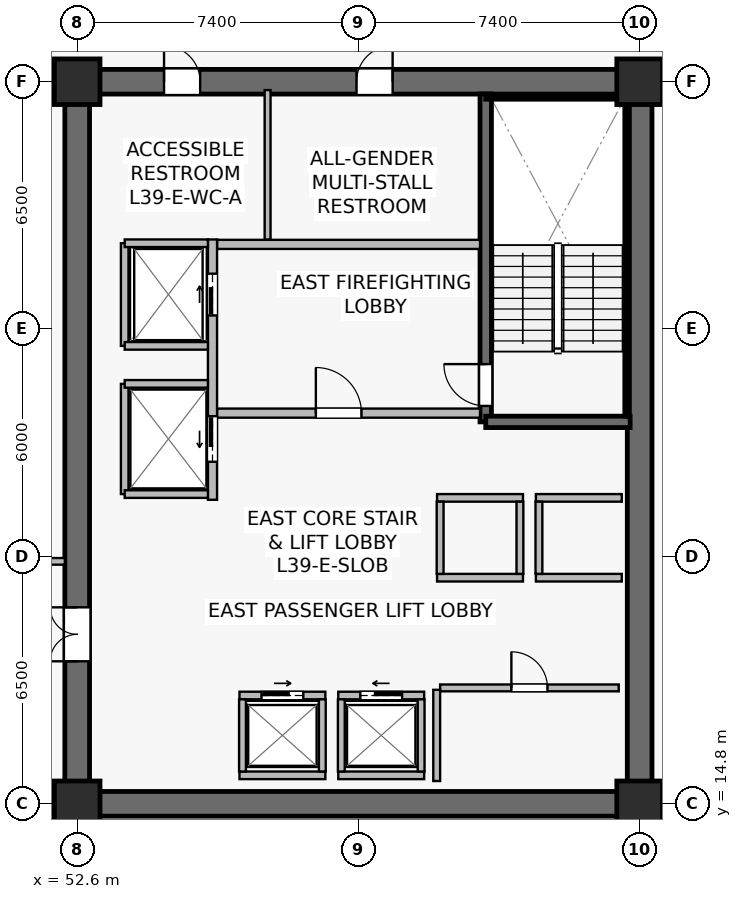
"""IFC4 building model, lengths in metres.
Left out: names, types, materials, properties, quantities, classifications, styles, units other than length and angle.
Written with IfcOpenShell. Run it as: python <this file> out.ifc"""

import sys

from ifc_helpers import new_model, si_unit, direction, frame, frame_2d, origin, origin_2d, place, context, subcontext, project, spatial, rectangle, extrude, source, transform, mapped, element, fill, save


model = new_model("IFC4")
c1 = context("Model", 3, precision=1e-05, world=origin(), true_north=direction((0.0, 1.0)))
c2 = subcontext(c1, "Body", "Model", "MODEL_VIEW")
j1 = project(units=[si_unit("LENGTHUNIT", "METRE"), si_unit("PLANEANGLEUNIT", "RADIAN")], contexts=[c1])
p1 = place(None, origin())
s1 = spatial("IfcSite", under=j1, at=p1, CompositionType="ELEMENT")
p2 = place(p1, origin())
s2 = spatial("IfcBuilding", under=s1, at=p2, CompositionType="ELEMENT")
p3 = place(p2, frame((0.0, 0.0, 162.5)))
s3 = spatial("IfcBuildingStorey", under=s2, at=p3, CompositionType="ELEMENT", Elevation=162.5)
p4 = place(p3, frame((52.275, 14.8, 0.0), z_axis=(0.0, 0.0, 1.0), x_axis=(1.0, 0.0, 0.0)))
e1 = element("IfcWall", 1, at=p4, inside=s3, PredefinedType="SHEAR", context=c2, shape_type="SweptSolid", body=[
    extrude(rectangle(XDim=15.45, YDim=0.65, at=frame_2d((7.725, 0.0))), origin(), (0.0, 0.0, 1.0), 3.79),
])
p5 = place(p3, frame((52.275, 33.8, 0.0), z_axis=(0.0, 0.0, 1.0), x_axis=(1.0, 0.0, 0.0)))
e2 = element("IfcWall", 2, at=p5, inside=s3, PredefinedType="SHEAR", context=c2, shape_type="SweptSolid", body=[
    extrude(rectangle(XDim=15.45, YDim=0.65, at=frame_2d((7.725, 0.0))), origin(), (0.0, 0.0, 1.0), 3.79),
])
p6 = place(p5, frame((7.675, 0.0, 0.0)))
e3 = element("IfcOpeningElement", 3, at=p6, cuts=e2, PredefinedType="OPENING", context=c2, shape_type="SweptSolid", body=[
    extrude(rectangle(XDim=0.95, YDim=2.15, at=frame_2d((0.475, 1.075))), frame((0.0, 0.335, 0.0), z_axis=(0.0, -1.0, 0.0), x_axis=(1.0, 0.0, 0.0)), (0.0, 0.0, 1.0), 0.67),
])
p7 = place(p5, frame((2.61, 0.0, 0.0)))
e4 = element("IfcOpeningElement", 4, at=p7, cuts=e2, PredefinedType="OPENING", context=c2, shape_type="SweptSolid", body=[
    extrude(rectangle(XDim=0.95, YDim=2.15, at=frame_2d((0.475, 1.075))), frame((0.0, 0.335, 0.0), z_axis=(0.0, -1.0, 0.0), x_axis=(1.0, 0.0, 0.0)), (0.0, 0.0, 1.0), 0.67),
])
p8 = place(p3, frame((52.6, 15.125, 0.0), z_axis=(0.0, 0.0, 1.0), x_axis=(0.0, 1.0, 0.0)))
e5 = element("IfcWall", 5, at=p8, inside=s3, PredefinedType="SHEAR", context=c2, shape_type="SweptSolid", body=[
    extrude(rectangle(XDim=18.35, YDim=0.65, at=frame_2d((9.175, 0.0))), origin(), (0.0, 0.0, 1.0), 3.79),
])
p9 = place(p8, frame((3.425, 0.0, 0.0)))
e6 = element("IfcOpeningElement", 6, at=p9, cuts=e5, PredefinedType="OPENING", context=c2, shape_type="SweptSolid", body=[
    extrude(rectangle(XDim=1.42, YDim=2.2, at=frame_2d((0.71, 1.1))), frame((0.0, 0.335, 0.0), z_axis=(0.0, -1.0, 0.0), x_axis=(1.0, 0.0, 0.0)), (0.0, 0.0, 1.0), 0.67),
])
p10 = place(p3, frame((67.4, 15.125, 0.0), z_axis=(0.0, 0.0, 1.0), x_axis=(0.0, 1.0, 0.0)))
e7 = element("IfcWall", 7, at=p10, inside=s3, PredefinedType="SHEAR", context=c2, shape_type="SweptSolid", body=[
    extrude(rectangle(XDim=18.35, YDim=0.65, at=frame_2d((9.175, 0.0))), origin(), (0.0, 0.0, 1.0), 3.79),
])
p11 = place(p3, frame((63.35, 24.85, 0.0), z_axis=(0.0, 0.0, 1.0), x_axis=(0.0, 1.0, 0.0)))
e8 = element("IfcWall", 8, at=p11, inside=s3, PredefinedType="SHEAR", context=c2, shape_type="SweptSolid", body=[
    extrude(rectangle(XDim=8.63, YDim=0.3, at=frame_2d((4.315, 0.0))), origin(), (0.0, 0.0, 1.0), 3.79),
])
p12 = place(p11, frame((0.42, 0.0, 0.0)))
e9 = element("IfcOpeningElement", 9, at=p12, cuts=e8, PredefinedType="OPENING", context=c2, shape_type="SweptSolid", body=[
    extrude(rectangle(XDim=1.1, YDim=2.15, at=frame_2d((0.55, 1.075))), frame((0.0, 0.16, 0.0), z_axis=(0.0, -1.0, 0.0), x_axis=(1.0, 0.0, 0.0)), (0.0, 0.0, 1.0), 0.32),
])
p13 = place(p3, frame((63.35, 24.85, 0.0), z_axis=(0.0, 0.0, 1.0), x_axis=(1.0, 0.0, 0.0)))
e10 = element("IfcWall", 10, at=p13, inside=s3, PredefinedType="SHEAR", context=c2, shape_type="SweptSolid", body=[
    extrude(rectangle(XDim=3.8, YDim=0.3, at=frame_2d((1.9, 0.0))), origin(), (0.0, 0.0, 1.0), 3.79),
])
p14 = place(p3, frame((63.35, 33.4, 0.0), z_axis=(0.0, 0.0, 1.0), x_axis=(1.0, 0.0, 0.0)))
e11 = element("IfcWall", 11, at=p14, inside=s3, PredefinedType="SOLIDWALL", context=c2, shape_type="SweptSolid", body=[
    extrude(rectangle(XDim=3.72, YDim=0.12, at=frame_2d((1.86, 0.0))), origin(), (0.0, 0.0, 1.0), 3.79),
])
p15 = place(p3, frame((67.07, 25.0, 0.0), z_axis=(0.0, 0.0, 1.0), x_axis=(0.0, 1.0, 0.0)))
e12 = element("IfcWall", 12, at=p15, inside=s3, PredefinedType="SOLIDWALL", context=c2, shape_type="SweptSolid", body=[
    extrude(rectangle(XDim=8.32, YDim=0.12, at=frame_2d((4.16, 0.0))), origin(), (0.0, 0.0, 1.0), 3.79),
])
m1 = source(origin(), c2, "Body", "SweptSolid", [
    extrude(rectangle(XDim=1.2, YDim=1.2, at=origin_2d()), origin(), (0.0, 0.0, 1.0), 4.1),
])
for number, where, z_axis, x_axis in (
    (13, (52.6, 14.8, 0.0), (0.0, 0.0, 1.0), (1.0, 0.0, 0.0)),
    (14, (67.4, 14.8, 0.0), (0.0, 0.0, 1.0), (1.0, 0.0, 0.0)),
    (15, (52.6, 33.8, 0.0), (0.0, 0.0, 1.0), (1.0, 0.0, 0.0)),
    (16, (67.4, 33.8, 0.0), (0.0, 0.0, 1.0), (1.0, 0.0, 0.0)),
):
    element("IfcColumn", number, at=place(p3, frame(where, z_axis=z_axis, x_axis=x_axis)), inside=s3, PredefinedType="COLUMN", context=c2, shape_type="MappedRepresentation", body=[
        mapped(m1, transform((0.0, 0.0, 0.0), scale=1.0)),
    ])
p16 = place(p3, frame((56.28, 25.08, 0.0), z_axis=(0.0, 0.0, 1.0), x_axis=(1.0, 0.0, 0.0)))
e17 = element("IfcWall", 17, at=p16, inside=s3, PredefinedType="SOLIDWALL", context=c2, shape_type="SweptSolid", body=[
    extrude(rectangle(XDim=6.92, YDim=0.24, at=frame_2d((3.46, 0.0))), origin(), (0.0, 0.0, 1.0), 3.187),
])
p17 = place(p16, frame((2.6, 0.0, 0.0)))
e18 = element("IfcOpeningElement", 18, at=p17, cuts=e17, PredefinedType="OPENING", context=c2, shape_type="SweptSolid", body=[
    extrude(rectangle(XDim=1.2, YDim=2.16, at=frame_2d((0.6, 1.08))), frame((0.0, 0.13, 0.0), z_axis=(0.0, -1.0, 0.0), x_axis=(1.0, 0.0, 0.0)), (0.0, 0.0, 1.0), 0.26),
])
p18 = place(p3, frame((56.28, 29.52, 0.0), z_axis=(0.0, 0.0, 1.0), x_axis=(1.0, 0.0, 0.0)))
e19 = element("IfcWall", 19, at=p18, inside=s3, PredefinedType="SOLIDWALL", context=c2, shape_type="SweptSolid", body=[
    extrude(rectangle(XDim=6.92, YDim=0.24, at=frame_2d((3.46, 0.0))), origin(), (0.0, 0.0, 1.0), 3.187),
])
p19 = place(p3, frame((56.16, 22.8, 0.0), z_axis=(0.0, 0.0, 1.0), x_axis=(0.0, 1.0, 0.0)))
e20 = element("IfcWall", 20, at=p19, inside=s3, PredefinedType="SOLIDWALL", context=c2, shape_type="SweptSolid", body=[
    extrude(rectangle(XDim=6.85, YDim=0.24, at=frame_2d((3.425, 0.0))), origin(), (0.0, 0.0, 1.0), 2.925),
])
p20 = place(p19, frame((4.85, 0.0, 0.0)))
e21 = element("IfcOpeningElement", 21, at=p20, cuts=e20, PredefinedType="OPENING", context=c2, shape_type="SweptSolid", body=[
    extrude(rectangle(XDim=1.1, YDim=2.22, at=frame_2d((0.55, 1.11))), frame((0.0, 0.13, 0.0), z_axis=(0.0, -1.0, 0.0), x_axis=(1.0, 0.0, 0.0)), (0.0, 0.0, 1.0), 0.26),
])
p21 = place(p19, frame((1.0, 0.0, 0.0)))
e22 = element("IfcOpeningElement", 22, at=p21, cuts=e20, PredefinedType="OPENING", context=c2, shape_type="SweptSolid", body=[
    extrude(rectangle(XDim=1.2, YDim=2.22, at=frame_2d((0.6, 1.11))), frame((0.0, 0.13, 0.0), z_axis=(0.0, -1.0, 0.0), x_axis=(1.0, 0.0, 0.0)), (0.0, 0.0, 1.0), 0.26),
])
p22 = place(p3, frame((59.47, 17.65, 0.0), z_axis=(0.0, 0.0, 1.0), x_axis=(1.0, 0.0, 0.0)))
e23 = element("IfcWall", 23, at=p22, inside=s3, PredefinedType="SOLIDWALL", context=c2, shape_type="SweptSolid", body=[
    extrude(rectangle(XDim=2.26, YDim=0.2, at=frame_2d((1.13, 0.0))), origin(), (0.0, 0.0, 1.0), 3.187),
])
p23 = place(p22, frame((0.58, 0.0, 0.0)))
e24 = element("IfcOpeningElement", 24, at=p23, cuts=e23, PredefinedType="OPENING", context=c2, shape_type="SweptSolid", body=[
    extrude(rectangle(XDim=1.1, YDim=2.22, at=frame_2d((0.55, 1.11))), frame((0.0, 0.11, 0.0), z_axis=(0.0, -1.0, 0.0), x_axis=(1.0, 0.0, 0.0)), (0.0, 0.0, 1.0), 0.22),
])
p24 = place(p3, frame((59.47, 15.55, 0.0), z_axis=(0.0, 0.0, 1.0), x_axis=(1.0, 0.0, 0.0)))
e25 = element("IfcWall", 25, at=p24, inside=s3, PredefinedType="SOLIDWALL", context=c2, shape_type="SweptSolid", body=[
    extrude(rectangle(XDim=2.26, YDim=0.2, at=frame_2d((1.13, 0.0))), origin(), (0.0, 0.0, 1.0), 3.187),
])
for number, where, z_axis, x_axis in (
    (26, (59.55, 15.65, 0.0), (0.0, 0.0, 1.0), (0.0, 1.0, 0.0)),
    (27, (61.65, 15.65, 0.0), (0.0, 0.0, 1.0), (0.0, 1.0, 0.0)),
):
    element("IfcWall", number, at=place(p3, frame(where, z_axis=z_axis, x_axis=x_axis)), inside=s3, PredefinedType="SOLIDWALL", context=c2, shape_type="SweptSolid", body=[
        extrude(rectangle(XDim=1.9, YDim=0.18, at=frame_2d((0.95, 0.0))), origin(), (0.0, 0.0, 1.0), 3.79),
    ])
p25 = place(p3, frame((56.87, 17.65, 0.0), z_axis=(0.0, 0.0, 1.0), x_axis=(1.0, 0.0, 0.0)))
e28 = element("IfcWall", 28, at=p25, inside=s3, PredefinedType="SOLIDWALL", context=c2, shape_type="SweptSolid", body=[
    extrude(rectangle(XDim=2.26, YDim=0.2, at=frame_2d((1.13, 0.0))), origin(), (0.0, 0.0, 1.0), 3.79),
])
p26 = place(p25, frame((0.58, 0.0, 0.0)))
e29 = element("IfcOpeningElement", 29, at=p26, cuts=e28, PredefinedType="OPENING", context=c2, shape_type="SweptSolid", body=[
    extrude(rectangle(XDim=1.1, YDim=2.22, at=frame_2d((0.55, 1.11))), frame((0.0, 0.11, 0.0), z_axis=(0.0, -1.0, 0.0), x_axis=(1.0, 0.0, 0.0)), (0.0, 0.0, 1.0), 0.22),
])
p27 = place(p3, frame((56.87, 15.55, 0.0), z_axis=(0.0, 0.0, 1.0), x_axis=(1.0, 0.0, 0.0)))
e30 = element("IfcWall", 30, at=p27, inside=s3, PredefinedType="SOLIDWALL", context=c2, shape_type="SweptSolid", body=[
    extrude(rectangle(XDim=2.26, YDim=0.2, at=frame_2d((1.13, 0.0))), origin(), (0.0, 0.0, 1.0), 3.79),
])
for number, where, z_axis, x_axis in (
    (31, (56.95, 15.65, 0.0), (0.0, 0.0, 1.0), (0.0, 1.0, 0.0)),
    (32, (59.05, 15.65, 0.0), (0.0, 0.0, 1.0), (0.0, 1.0, 0.0)),
):
    element("IfcWall", number, at=place(p3, frame(where, z_axis=z_axis, x_axis=x_axis)), inside=s3, PredefinedType="SOLIDWALL", context=c2, shape_type="SweptSolid", body=[
        extrude(rectangle(XDim=1.9, YDim=0.18, at=frame_2d((0.95, 0.0))), origin(), (0.0, 0.0, 1.0), 3.79),
    ])
for number, where, z_axis, x_axis in (
    (33, (64.67, 20.75, 0.0), (0.0, 0.0, 1.0), (1.0, 0.0, 0.0)),
    (34, (64.67, 22.85, 0.0), (0.0, 0.0, 1.0), (1.0, 0.0, 0.0)),
):
    element("IfcWall", number, at=place(p3, frame(where, z_axis=z_axis, x_axis=x_axis)), inside=s3, PredefinedType="SOLIDWALL", context=c2, shape_type="SweptSolid", body=[
        extrude(rectangle(XDim=2.26, YDim=0.2, at=frame_2d((1.13, 0.0))), origin(), (0.0, 0.0, 1.0), 3.79),
    ])
p28 = place(p3, frame((64.75, 20.85, 0.0), z_axis=(0.0, 0.0, 1.0), x_axis=(0.0, 1.0, 0.0)))
e35 = element("IfcWall", 35, at=p28, inside=s3, PredefinedType="SOLIDWALL", context=c2, shape_type="SweptSolid", body=[
    extrude(rectangle(XDim=1.9, YDim=0.18, at=frame_2d((0.95, 0.0))), origin(), (0.0, 0.0, 1.0), 3.79),
])
for number, where, z_axis, x_axis in (
    (36, (62.07, 20.75, 0.0), (0.0, 0.0, 1.0), (1.0, 0.0, 0.0)),
    (37, (62.07, 22.85, 0.0), (0.0, 0.0, 1.0), (1.0, 0.0, 0.0)),
):
    element("IfcWall", number, at=place(p3, frame(where, z_axis=z_axis, x_axis=x_axis)), inside=s3, PredefinedType="SOLIDWALL", context=c2, shape_type="SweptSolid", body=[
        extrude(rectangle(XDim=2.26, YDim=0.2, at=frame_2d((1.13, 0.0))), origin(), (0.0, 0.0, 1.0), 3.79),
    ])
for number, where, z_axis, x_axis in (
    (38, (62.15, 20.85, 0.0), (0.0, 0.0, 1.0), (0.0, 1.0, 0.0)),
    (39, (64.25, 20.85, 0.0), (0.0, 0.0, 1.0), (0.0, 1.0, 0.0)),
):
    element("IfcWall", number, at=place(p3, frame(where, z_axis=z_axis, x_axis=x_axis)), inside=s3, PredefinedType="SOLIDWALL", context=c2, shape_type="SweptSolid", body=[
        extrude(rectangle(XDim=1.9, YDim=0.18, at=frame_2d((0.95, 0.0))), origin(), (0.0, 0.0, 1.0), 3.79),
    ])
p29 = place(p3, frame((53.85, 26.85, 0.0), z_axis=(0.0, 0.0, 1.0), x_axis=(0.0, 1.0, 0.0)))
e40 = element("IfcWall", 40, at=p29, inside=s3, PredefinedType="SOLIDWALL", context=c2, shape_type="SweptSolid", body=[
    extrude(rectangle(XDim=2.7, YDim=0.2, at=frame_2d((1.35, 0.0))), origin(), (0.0, 0.0, 1.0), 3.79),
])
p30 = place(p3, frame((53.85, 29.55, 0.0), z_axis=(0.0, 0.0, 1.0), x_axis=(1.0, 0.0, 0.0)))
e41 = element("IfcWall", 41, at=p30, inside=s3, PredefinedType="SOLIDWALL", context=c2, shape_type="SweptSolid", body=[
    extrude(rectangle(XDim=2.19, YDim=0.2, at=frame_2d((1.095, 0.0))), origin(), (0.0, 0.0, 1.0), 3.79),
])
p31 = place(p3, frame((53.85, 26.85, 0.0), z_axis=(0.0, 0.0, 1.0), x_axis=(1.0, 0.0, 0.0)))
e42 = element("IfcWall", 42, at=p31, inside=s3, PredefinedType="SOLIDWALL", context=c2, shape_type="SweptSolid", body=[
    extrude(rectangle(XDim=2.19, YDim=0.2, at=frame_2d((1.095, 0.0))), origin(), (0.0, 0.0, 1.0), 3.187),
])
p32 = place(p3, frame((53.85, 22.95, 0.0), z_axis=(0.0, 0.0, 1.0), x_axis=(0.0, 1.0, 0.0)))
e43 = element("IfcWall", 43, at=p32, inside=s3, PredefinedType="SOLIDWALL", context=c2, shape_type="SweptSolid", body=[
    extrude(rectangle(XDim=2.9, YDim=0.2, at=frame_2d((1.45, 0.0))), origin(), (0.0, 0.0, 1.0), 2.925),
])
for number, where, z_axis, x_axis in (
    (44, (53.85, 25.85, 0.0), (0.0, 0.0, 1.0), (1.0, 0.0, 0.0)),
    (45, (53.85, 22.95, 0.0), (0.0, 0.0, 1.0), (1.0, 0.0, 0.0)),
):
    element("IfcWall", number, at=place(p3, frame(where, z_axis=z_axis, x_axis=x_axis)), inside=s3, PredefinedType="SOLIDWALL", context=c2, shape_type="SweptSolid", body=[
        extrude(rectangle(XDim=2.19, YDim=0.2, at=frame_2d((1.095, 0.0))), origin(), (0.0, 0.0, 1.0), 3.79),
    ])
p33 = place(p3, frame((62.15, 17.85, 0.0), z_axis=(0.0, 0.0, 1.0), x_axis=(1.0, 0.0, 0.0)))
e46 = element("IfcWall", 46, at=p33, inside=s3, PredefinedType="SOLIDWALL", context=c2, shape_type="SweptSolid", body=[
    extrude(rectangle(XDim=4.7, YDim=0.18, at=frame_2d((2.35, 0.0))), origin(), (0.0, 0.0, 1.0), 3.79),
])
p34 = place(p33, frame((1.875, 0.0, 0.0)))
e47 = element("IfcOpeningElement", 47, at=p34, cuts=e46, PredefinedType="OPENING", context=c2, shape_type="SweptSolid", body=[
    extrude(rectangle(XDim=0.95, YDim=2.15, at=frame_2d((0.475, 1.075))), frame((0.0, 0.1, 0.0), z_axis=(0.0, -1.0, 0.0), x_axis=(1.0, 0.0, 0.0)), (0.0, 0.0, 1.0), 0.2),
])
p35 = place(p3, frame((62.06, 15.4, 0.0), z_axis=(0.0, 0.0, 1.0), x_axis=(0.0, 1.0, 0.0)))
e48 = element("IfcWall", 48, at=p35, inside=s3, PredefinedType="SOLIDWALL", context=c2, shape_type="SweptSolid", body=[
    extrude(rectangle(XDim=2.4, YDim=0.18, at=frame_2d((1.2, 0.0))), origin(), (0.0, 0.0, 1.0), 3.79),
])
p36 = place(p3, frame((57.61, 29.65, 0.0), z_axis=(0.0, 0.0, 1.0), x_axis=(0.0, 1.0, 0.0)))
e49 = element("IfcWall", 49, at=p36, inside=s3, PredefinedType="PLUMBINGWALL", context=c2, shape_type="SweptSolid", body=[
    extrude(rectangle(XDim=3.93, YDim=0.155, at=frame_2d((1.965, 0.0))), origin(), (0.0, 0.0, 1.0), 3.79),
])
p37 = place(p3, frame((48.3, 34.26, 0.0), z_axis=(0.0, 0.0, 1.0), x_axis=(1.0, 0.0, 0.0)))
e50 = element("IfcWall", 50, at=p37, inside=s3, PredefinedType="PARTITIONING", context=c2, shape_type="SweptSolid", body=[
    extrude(rectangle(XDim=3.975, YDim=0.175, at=frame_2d((1.987, 0.0))), origin(), (0.0, 0.0, 1.0), 3.475),
])
p38 = place(p3, frame((48.3, 21.18, 0.0), z_axis=(0.0, 0.0, 1.0), x_axis=(1.0, 0.0, 0.0)))
e51 = element("IfcWall", 51, at=p38, inside=s3, PredefinedType="PARTITIONING", context=c2, shape_type="SweptSolid", body=[
    extrude(rectangle(XDim=3.975, YDim=0.175, at=frame_2d((1.987, 0.0))), origin(), (0.0, 0.0, 1.0), 3.79),
])
p39 = place(p38, frame((1.35, 0.0, 0.0)))
e52 = element("IfcOpeningElement", 52, at=p39, cuts=e51, PredefinedType="OPENING", context=c2, shape_type="SweptSolid", body=[
    extrude(rectangle(XDim=0.95, YDim=2.15, at=frame_2d((0.475, 1.075))), frame((0.0, 0.098, 0.0), z_axis=(0.0, -1.0, 0.0), x_axis=(1.0, 0.0, 0.0)), (0.0, 0.0, 1.0), 0.195),
])
m2 = source(origin(), c2, "Body", "SweptSolid", [
    extrude(rectangle(XDim=1.1, YDim=2.15, at=frame_2d((0.55, 1.075))), frame((0.0, 0.025, 0.0), z_axis=(0.0, -1.0, 0.0), x_axis=(1.0, 0.0, 0.0)), (0.0, 0.0, 1.0), 0.05),
])
p40 = place(p12, origin())
e53 = element("IfcDoor", 53, at=p40, inside=s3, OperationType="SINGLE_SWING_RIGHT", PredefinedType="DOOR", context=c2, shape_type="MappedRepresentation", body=[
    mapped(m2, transform((0.0, 0.0, 0.0), scale=1.0)),
])
fill(e9, e53)
m3 = source(origin(), c2, "Body", "SweptSolid", [
    extrude(rectangle(XDim=1.2, YDim=2.16, at=frame_2d((0.6, 1.08))), frame((0.0, 0.025, 0.0), z_axis=(0.0, -1.0, 0.0), x_axis=(1.0, 0.0, 0.0)), (0.0, 0.0, 1.0), 0.05),
])
p41 = place(p17, origin())
e54 = element("IfcDoor", 54, at=p41, inside=s3, OperationType="SINGLE_SWING_LEFT", PredefinedType="DOOR", context=c2, shape_type="MappedRepresentation", body=[
    mapped(m3, transform((0.0, 0.0, 0.0), scale=1.0)),
])
fill(e18, e54)
m4 = source(origin(), c2, "Body", "SweptSolid", [
    extrude(rectangle(XDim=1.1, YDim=2.22, at=frame_2d((0.55, 1.11))), frame((0.0, 0.025, 0.0), z_axis=(0.0, -1.0, 0.0), x_axis=(1.0, 0.0, 0.0)), (0.0, 0.0, 1.0), 0.05),
])
p42 = place(p23, origin())
e55 = element("IfcDoor", 55, at=p42, inside=s3, OperationType="SLIDING_TO_LEFT", PredefinedType="USERDEFINED", context=c2, shape_type="MappedRepresentation", body=[
    mapped(m4, transform((0.0, 0.0, 0.0), scale=1.0)),
])
fill(e24, e55)
p43 = place(p26, origin())
e56 = element("IfcDoor", 56, at=p43, inside=s3, OperationType="SLIDING_TO_RIGHT", PredefinedType="USERDEFINED", context=c2, shape_type="MappedRepresentation", body=[
    mapped(m4, transform((0.0, 0.0, 0.0), scale=1.0)),
])
fill(e29, e56)
p44 = place(p20, origin())
e57 = element("IfcDoor", 57, at=p44, inside=s3, OperationType="SLIDING_TO_RIGHT", PredefinedType="USERDEFINED", context=c2, shape_type="MappedRepresentation", body=[
    mapped(m4, transform((0.0, 0.0, 0.0), scale=1.0)),
])
fill(e21, e57)
m5 = source(origin(), c2, "Body", "SweptSolid", [
    extrude(rectangle(XDim=1.2, YDim=2.22, at=frame_2d((0.6, 1.11))), frame((0.0, 0.025, 0.0), z_axis=(0.0, -1.0, 0.0), x_axis=(1.0, 0.0, 0.0)), (0.0, 0.0, 1.0), 0.05),
])
p45 = place(p21, origin())
e58 = element("IfcDoor", 58, at=p45, inside=s3, OperationType="SLIDING_TO_LEFT", PredefinedType="USERDEFINED", context=c2, shape_type="MappedRepresentation", body=[
    mapped(m5, transform((0.0, 0.0, 0.0), scale=1.0)),
])
fill(e22, e58)
m6 = source(origin(), c2, "Body", "SweptSolid", [
    extrude(rectangle(XDim=0.95, YDim=2.15, at=frame_2d((0.475, 1.075))), frame((0.0, 0.025, 0.0), z_axis=(0.0, -1.0, 0.0), x_axis=(1.0, 0.0, 0.0)), (0.0, 0.0, 1.0), 0.05),
])
p46 = place(p34, origin())
e59 = element("IfcDoor", 59, at=p46, inside=s3, OperationType="SINGLE_SWING_LEFT", PredefinedType="DOOR", context=c2, shape_type="MappedRepresentation", body=[
    mapped(m6, transform((0.0, 0.0, 0.0), scale=1.0)),
])
fill(e47, e59)
m7 = source(origin(), c2, "Body", "SweptSolid", [
    extrude(rectangle(XDim=1.42, YDim=2.2, at=frame_2d((0.71, 1.1))), frame((0.0, 0.025, 0.0), z_axis=(0.0, -1.0, 0.0), x_axis=(1.0, 0.0, 0.0)), (0.0, 0.0, 1.0), 0.05),
])
p47 = place(p9, origin())
e60 = element("IfcDoor", 60, at=p47, inside=s3, OperationType="DOUBLE_DOOR_SINGLE_SWING", PredefinedType="DOOR", context=c2, shape_type="MappedRepresentation", body=[
    mapped(m7, transform((0.0, 0.0, 0.0), scale=1.0)),
])
fill(e6, e60)
p48 = place(p6, origin())
e61 = element("IfcDoor", 61, at=p48, inside=s3, OperationType="SINGLE_SWING_RIGHT", PredefinedType="DOOR", context=c2, shape_type="MappedRepresentation", body=[
    mapped(m6, transform((0.0, 0.0, 0.0), scale=1.0)),
])
fill(e3, e61)
p49 = place(p7, origin())
e62 = element("IfcDoor", 62, at=p49, inside=s3, OperationType="SINGLE_SWING_LEFT", PredefinedType="DOOR", context=c2, shape_type="MappedRepresentation", body=[
    mapped(m6, transform((0.0, 0.0, 0.0), scale=1.0)),
])
fill(e4, e62)
save(model, sys.argv[1])
